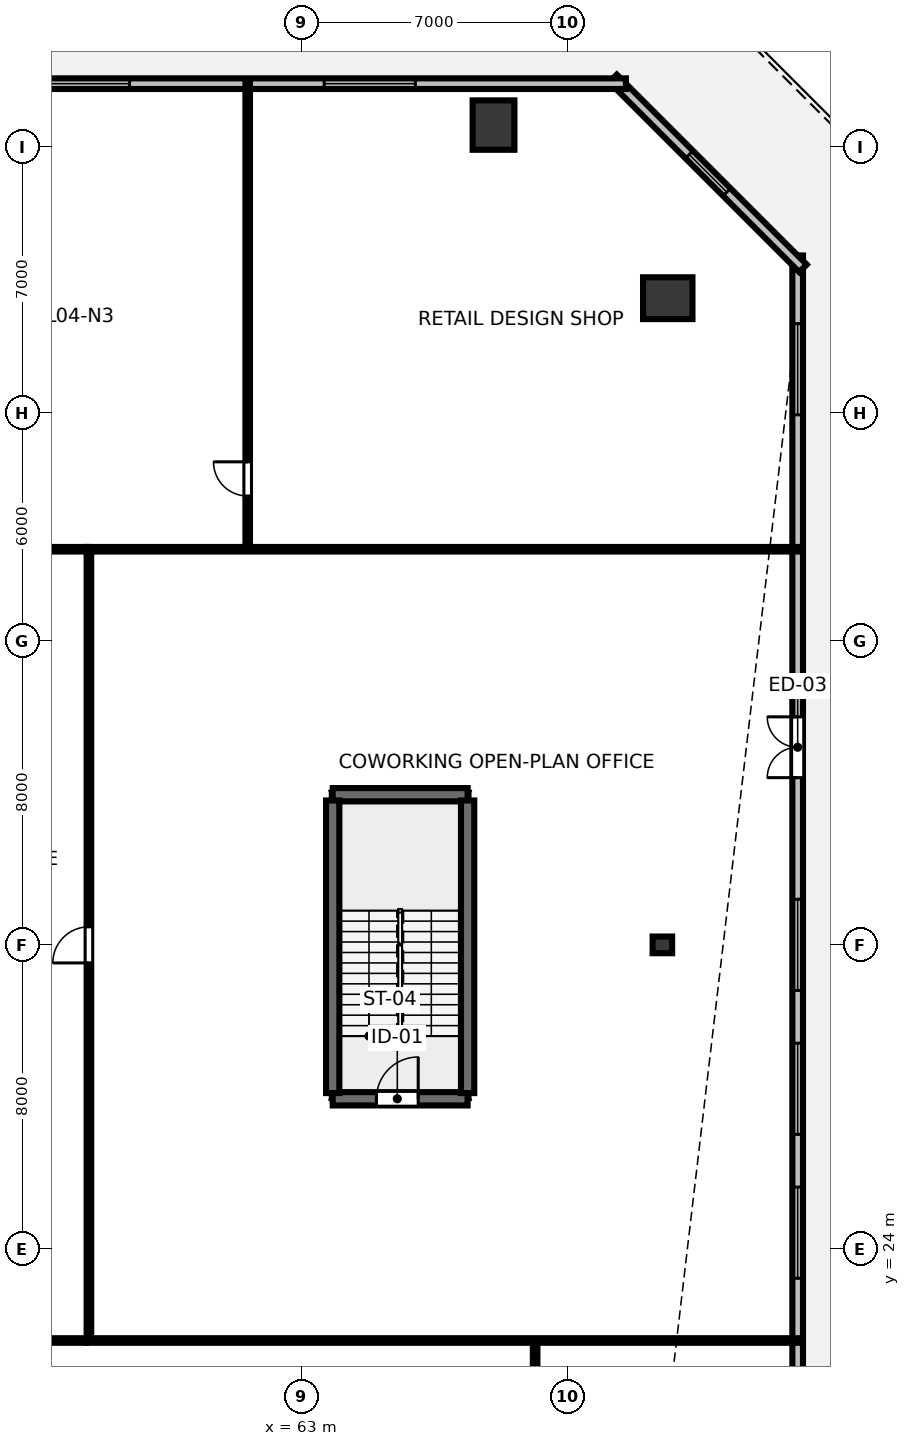
"""IFC4 building model, lengths in metres.
Left out: names, types, materials, properties, quantities, classifications, styles, units other than length and angle.
Written with IfcOpenShell. Run it as: python <this file> out.ifc"""

import sys

from ifc_helpers import new_model, si_unit, direction, frame, frame_2d, origin, origin_2d, place, context, subcontext, project, spatial, rectangle, hollow_rectangle, i_section, extrude, element, fill, save


model = new_model("IFC4")
c1 = context("Model", 3, precision=1e-05, world=origin(), true_north=direction((0.0, 1.0)))
c2 = subcontext(c1, "Body", "Model", "MODEL_VIEW")
j1 = project(units=[si_unit("LENGTHUNIT", "METRE"), si_unit("PLANEANGLEUNIT", "RADIAN")], contexts=[c1])
p1 = place(None, origin())
s1 = spatial("IfcSite", under=j1, at=p1, CompositionType="ELEMENT")
p2 = place(p1, origin())
s2 = spatial("IfcBuilding", under=s1, at=p2, CompositionType="ELEMENT")
p3 = place(p2, frame((0.0, 0.0, 18.5)))
s3 = spatial("IfcBuildingStorey", under=s2, at=p3, CompositionType="ELEMENT", Elevation=18.5)
p4 = place(p3, frame((72.5, 32.0, 0.0), z_axis=(0.0, 0.0, 1.0), x_axis=(0.0, 1.0, 0.0)))
e1 = element("IfcColumn", 1, at=p4, inside=s3, PredefinedType="COLUMN", context=c2, shape_type="SweptSolid", body=[
    extrude(i_section(OverallWidth=0.439, OverallDepth=0.514, WebThickness=0.06, FlangeThickness=0.097, FilletRadius=0.025, at=origin_2d()), origin(), (0.0, 0.0, 1.0), 4.048),
])
for number, where, z_axis, x_axis in (
    (2, (72.642, 49.016, 0.0), (0.0, 0.0, 1.0), (0.0, 1.0, 0.0)),
    (3, (68.057, 53.571, 0.0), (0.0, 0.0, 1.0), (1.0, 0.0, 0.0)),
):
    element("IfcColumn", number, at=place(p3, frame(where, z_axis=z_axis, x_axis=x_axis)), inside=s3, PredefinedType="COLUMN", context=c2, shape_type="SweptSolid", body=[
        extrude(hollow_rectangle(XDim=1.1, YDim=1.3, WallThickness=0.07, at=origin_2d()), origin(), (0.0, 0.0, 1.0), 4.048),
    ])
p5 = place(p3, frame((76.06, 13.86, 0.0), z_axis=(0.0, 0.0, 1.0), x_axis=(0.0, 1.0, 0.0)))
e4 = element("IfcWall", 4, at=p5, inside=s3, PredefinedType="STANDARD", context=c2, shape_type="SweptSolid", body=[
    extrude(rectangle(XDim=36.28, YDim=0.28, at=frame_2d((18.14, 0.0))), origin(), (0.0, 0.0, 1.0), 4.05),
])
p6 = place(p5, frame((22.54, 0.0, 0.0)))
e5 = element("IfcOpeningElement", 5, at=p6, cuts=e4, PredefinedType="OPENING", context=c2, shape_type="SweptSolid", body=[
    extrude(rectangle(XDim=1.6, YDim=2.15, at=frame_2d((0.8, 1.075))), frame((0.0, 0.15, 0.0), z_axis=(0.0, -1.0, 0.0), x_axis=(1.0, 0.0, 0.0)), (0.0, 0.0, 1.0), 0.3),
])
p7 = place(p5, frame((1.793, 0.0, 0.85)))
e6 = element("IfcOpeningElement", 6, at=p7, cuts=e4, PredefinedType="OPENING", context=c2, shape_type="SweptSolid", body=[
    extrude(rectangle(XDim=2.4, YDim=2.4, at=frame_2d((1.2, 1.2))), frame((0.0, 0.15, 0.0), z_axis=(0.0, -1.0, 0.0), x_axis=(1.0, 0.0, 0.0)), (0.0, 0.0, 1.0), 0.3),
])
p8 = place(p5, frame((9.367, 0.0, 0.85)))
e7 = element("IfcOpeningElement", 7, at=p8, cuts=e4, PredefinedType="OPENING", context=c2, shape_type="SweptSolid", body=[
    extrude(rectangle(XDim=2.4, YDim=2.4, at=frame_2d((1.2, 1.2))), frame((0.0, 0.15, 0.0), z_axis=(0.0, -1.0, 0.0), x_axis=(1.0, 0.0, 0.0)), (0.0, 0.0, 1.0), 0.3),
])
p9 = place(p5, frame((13.153, 0.0, 0.85)))
e8 = element("IfcOpeningElement", 8, at=p9, cuts=e4, PredefinedType="OPENING", context=c2, shape_type="SweptSolid", body=[
    extrude(rectangle(XDim=2.4, YDim=2.4, at=frame_2d((1.2, 1.2))), frame((0.0, 0.15, 0.0), z_axis=(0.0, -1.0, 0.0), x_axis=(1.0, 0.0, 0.0)), (0.0, 0.0, 1.0), 0.3),
])
p10 = place(p5, frame((16.94, 0.0, 0.85)))
e9 = element("IfcOpeningElement", 9, at=p10, cuts=e4, PredefinedType="OPENING", context=c2, shape_type="SweptSolid", body=[
    extrude(rectangle(XDim=2.4, YDim=2.4, at=frame_2d((1.2, 1.2))), frame((0.0, 0.15, 0.0), z_axis=(0.0, -1.0, 0.0), x_axis=(1.0, 0.0, 0.0)), (0.0, 0.0, 1.0), 0.3),
])
p11 = place(p5, frame((32.087, 0.0, 0.85)))
e10 = element("IfcOpeningElement", 10, at=p11, cuts=e4, PredefinedType="OPENING", context=c2, shape_type="SweptSolid", body=[
    extrude(rectangle(XDim=2.4, YDim=2.4, at=frame_2d((1.2, 1.2))), frame((0.0, 0.15, 0.0), z_axis=(0.0, -1.0, 0.0), x_axis=(1.0, 0.0, 0.0)), (0.0, 0.0, 1.0), 0.3),
])
p12 = place(p3, frame((76.2, 49.802, 0.0), z_axis=(0.0, 0.0, 1.0), x_axis=(-0.707106781187, 0.707106781187, 0.0)))
e11 = element("IfcWall", 11, at=p12, inside=s3, PredefinedType="STANDARD", context=c2, shape_type="SweptSolid", body=[
    extrude(rectangle(XDim=7.068, YDim=0.28, at=frame_2d((3.534, 0.0))), origin(), (0.0, 0.0, 1.0), 4.05),
])
p13 = place(p12, frame((2.834, 0.0, 1.5)))
e12 = element("IfcOpeningElement", 12, at=p13, cuts=e11, PredefinedType="OPENING", context=c2, shape_type="SweptSolid", body=[
    extrude(rectangle(XDim=1.4, YDim=1.2, at=frame_2d((0.7, 0.6))), frame((0.0, 0.15, 0.0), z_axis=(0.0, -1.0, 0.0), x_axis=(1.0, 0.0, 0.0)), (0.0, 0.0, 1.0), 0.3),
])
p14 = place(p3, frame((71.54, 54.66, 0.0), z_axis=(0.0, 0.0, 1.0), x_axis=(-1.0, 0.0, 0.0)))
e13 = element("IfcWall", 13, at=p14, inside=s3, PredefinedType="STANDARD", context=c2, shape_type="SweptSolid", body=[
    extrude(rectangle(XDim=51.08, YDim=0.28, at=frame_2d((25.54, 0.0))), origin(), (0.0, 0.0, 1.0), 4.05),
])
p15 = place(p14, frame((5.54, 0.0, 0.85)))
e14 = element("IfcOpeningElement", 14, at=p15, cuts=e13, PredefinedType="OPENING", context=c2, shape_type="SweptSolid", body=[
    extrude(rectangle(XDim=2.4, YDim=2.4, at=frame_2d((1.2, 1.2))), frame((0.0, 0.15, 0.0), z_axis=(0.0, -1.0, 0.0), x_axis=(1.0, 0.0, 0.0)), (0.0, 0.0, 1.0), 0.3),
])
p16 = place(p14, frame((13.06, 0.0, 0.85)))
e15 = element("IfcOpeningElement", 15, at=p16, cuts=e13, PredefinedType="OPENING", context=c2, shape_type="SweptSolid", body=[
    extrude(rectangle(XDim=2.4, YDim=2.4, at=frame_2d((1.2, 1.2))), frame((0.0, 0.15, 0.0), z_axis=(0.0, -1.0, 0.0), x_axis=(1.0, 0.0, 0.0)), (0.0, 0.0, 1.0), 0.3),
])
p17 = place(p14, frame((16.82, 0.0, 0.85)))
e16 = element("IfcOpeningElement", 16, at=p17, cuts=e13, PredefinedType="OPENING", context=c2, shape_type="SweptSolid", body=[
    extrude(rectangle(XDim=2.4, YDim=2.4, at=frame_2d((1.2, 1.2))), frame((0.0, 0.15, 0.0), z_axis=(0.0, -1.0, 0.0), x_axis=(1.0, 0.0, 0.0)), (0.0, 0.0, 1.0), 0.3),
])
p18 = place(p14, frame((20.58, 0.0, 0.85)))
e17 = element("IfcOpeningElement", 17, at=p18, cuts=e13, PredefinedType="OPENING", context=c2, shape_type="SweptSolid", body=[
    extrude(rectangle(XDim=2.4, YDim=2.4, at=frame_2d((1.2, 1.2))), frame((0.0, 0.15, 0.0), z_axis=(0.0, -1.0, 0.0), x_axis=(1.0, 0.0, 0.0)), (0.0, 0.0, 1.0), 0.3),
])
p19 = place(p14, frame((28.1, 0.0, 0.85)))
e18 = element("IfcOpeningElement", 18, at=p19, cuts=e13, PredefinedType="OPENING", context=c2, shape_type="SweptSolid", body=[
    extrude(rectangle(XDim=2.4, YDim=2.4, at=frame_2d((1.2, 1.2))), frame((0.0, 0.15, 0.0), z_axis=(0.0, -1.0, 0.0), x_axis=(1.0, 0.0, 0.0)), (0.0, 0.0, 1.0), 0.3),
])
p20 = place(p14, frame((31.86, 0.0, 0.85)))
e19 = element("IfcOpeningElement", 19, at=p20, cuts=e13, PredefinedType="OPENING", context=c2, shape_type="SweptSolid", body=[
    extrude(rectangle(XDim=2.4, YDim=2.4, at=frame_2d((1.2, 1.2))), frame((0.0, 0.15, 0.0), z_axis=(0.0, -1.0, 0.0), x_axis=(1.0, 0.0, 0.0)), (0.0, 0.0, 1.0), 0.3),
])
p21 = place(p14, frame((35.62, 0.0, 0.85)))
e20 = element("IfcOpeningElement", 20, at=p21, cuts=e13, PredefinedType="OPENING", context=c2, shape_type="SweptSolid", body=[
    extrude(rectangle(XDim=2.4, YDim=2.4, at=frame_2d((1.2, 1.2))), frame((0.0, 0.15, 0.0), z_axis=(0.0, -1.0, 0.0), x_axis=(1.0, 0.0, 0.0)), (0.0, 0.0, 1.0), 0.3),
])
p22 = place(p14, frame((43.14, 0.0, 0.85)))
e21 = element("IfcOpeningElement", 21, at=p22, cuts=e13, PredefinedType="OPENING", context=c2, shape_type="SweptSolid", body=[
    extrude(rectangle(XDim=2.4, YDim=2.4, at=frame_2d((1.2, 1.2))), frame((0.0, 0.15, 0.0), z_axis=(0.0, -1.0, 0.0), x_axis=(1.0, 0.0, 0.0)), (0.0, 0.0, 1.0), 0.3),
])
p23 = place(p3, frame((69.151, 21.59, 0.0), z_axis=(0.0, 0.0, 1.0), x_axis=(0.0, -1.0, 0.0)))
e22 = element("IfcWall", 22, at=p23, inside=s3, PredefinedType="PARTITIONING", context=c2, shape_type="SweptSolid", body=[
    extrude(rectangle(XDim=12.25, YDim=0.12, at=frame_2d((6.125, 0.0))), origin(), (0.0, 0.0, 1.0), 2.89),
])
p24 = place(p23, frame((1.4, 0.0, 0.0)))
e23 = element("IfcOpeningElement", 23, at=p24, cuts=e22, PredefinedType="OPENING", context=c2, shape_type="SweptSolid", body=[
    extrude(rectangle(XDim=0.9, YDim=2.15, at=frame_2d((0.45, 1.075))), frame((0.0, 0.07, 0.0), z_axis=(0.0, -1.0, 0.0), x_axis=(1.0, 0.0, 0.0)), (0.0, 0.0, 1.0), 0.14),
])
p25 = place(p3, frame((34.65, 21.59, 0.0), z_axis=(0.0, 0.0, 1.0), x_axis=(1.0, 0.0, 0.0)))
e24 = element("IfcWall", 24, at=p25, inside=s3, PredefinedType="PARTITIONING", context=c2, shape_type="SweptSolid", body=[
    extrude(rectangle(XDim=22.7, YDim=0.12, at=frame_2d((11.35, 0.0))), origin(), (0.0, 0.0, 1.0), 2.89),
])
p26 = place(p25, frame((8.028, 0.0, 0.0)))
e25 = element("IfcOpeningElement", 25, at=p26, cuts=e24, PredefinedType="OPENING", context=c2, shape_type="SweptSolid", body=[
    extrude(rectangle(XDim=0.95, YDim=2.15, at=frame_2d((0.475, 1.075))), frame((0.0, 0.07, 0.0), z_axis=(0.0, -1.0, 0.0), x_axis=(1.0, 0.0, 0.0)), (0.0, 0.0, 1.0), 0.14),
])
p27 = place(p25, frame((19.238, 0.0, 0.0)))
e26 = element("IfcOpeningElement", 26, at=p27, cuts=e24, PredefinedType="OPENING", context=c2, shape_type="SweptSolid", body=[
    extrude(rectangle(XDim=0.95, YDim=2.15, at=frame_2d((0.475, 1.075))), frame((0.0, 0.07, 0.0), z_axis=(0.0, -1.0, 0.0), x_axis=(1.0, 0.0, 0.0)), (0.0, 0.0, 1.0), 0.14),
])
p28 = place(p3, frame((61.588, 42.41, 0.0), z_axis=(0.0, 0.0, 1.0), x_axis=(0.0, 1.0, 0.0)))
e27 = element("IfcWall", 27, at=p28, inside=s3, PredefinedType="PARTITIONING", context=c2, shape_type="SweptSolid", body=[
    extrude(rectangle(XDim=12.25, YDim=0.12, at=frame_2d((6.125, 0.0))), origin(), (0.0, 0.0, 1.0), 2.89),
])
p29 = place(p28, frame((1.4, 0.0, 0.0)))
e28 = element("IfcOpeningElement", 28, at=p29, cuts=e27, PredefinedType="OPENING", context=c2, shape_type="SweptSolid", body=[
    extrude(rectangle(XDim=0.9, YDim=2.15, at=frame_2d((0.45, 1.075))), frame((0.0, 0.07, 0.0), z_axis=(0.0, -1.0, 0.0), x_axis=(1.0, 0.0, 0.0)), (0.0, 0.0, 1.0), 0.14),
])
p30 = place(p3, frame((34.65, 42.41, 0.0), z_axis=(0.0, 0.0, 1.0), x_axis=(1.0, 0.0, 0.0)))
e29 = element("IfcWall", 29, at=p30, inside=s3, PredefinedType="PARTITIONING", context=c2, shape_type="SweptSolid", body=[
    extrude(rectangle(XDim=22.7, YDim=0.12, at=frame_2d((11.35, 0.0))), origin(), (0.0, 0.0, 1.0), 2.89),
])
p31 = place(p30, frame((4.792, 0.0, 0.0)))
e30 = element("IfcOpeningElement", 30, at=p31, cuts=e29, PredefinedType="OPENING", context=c2, shape_type="SweptSolid", body=[
    extrude(rectangle(XDim=0.95, YDim=2.15, at=frame_2d((0.475, 1.075))), frame((0.0, 0.07, 0.0), z_axis=(0.0, -1.0, 0.0), x_axis=(1.0, 0.0, 0.0)), (0.0, 0.0, 1.0), 0.14),
])
p32 = place(p30, frame((16.002, 0.0, 0.0)))
e31 = element("IfcOpeningElement", 31, at=p32, cuts=e29, PredefinedType="OPENING", context=c2, shape_type="SweptSolid", body=[
    extrude(rectangle(XDim=0.95, YDim=2.15, at=frame_2d((0.475, 1.075))), frame((0.0, 0.07, 0.0), z_axis=(0.0, -1.0, 0.0), x_axis=(1.0, 0.0, 0.0)), (0.0, 0.0, 1.0), 0.14),
])
p33 = place(p3, frame((57.41, 21.65, 0.0), z_axis=(0.0, 0.0, 1.0), x_axis=(0.0, 1.0, 0.0)))
e32 = element("IfcWall", 32, at=p33, inside=s3, PredefinedType="PARTITIONING", context=c2, shape_type="SweptSolid", body=[
    extrude(rectangle(XDim=20.7, YDim=0.12, at=frame_2d((10.35, 0.0))), origin(), (0.0, 0.0, 1.0), 2.89),
])
p34 = place(p33, frame((9.875, 0.0, 0.0)))
e33 = element("IfcOpeningElement", 33, at=p34, cuts=e32, PredefinedType="OPENING", context=c2, shape_type="SweptSolid", body=[
    extrude(rectangle(XDim=0.95, YDim=2.15, at=frame_2d((0.475, 1.075))), frame((0.0, 0.07, 0.0), z_axis=(0.0, -1.0, 0.0), x_axis=(1.0, 0.0, 0.0)), (0.0, 0.0, 1.0), 0.14),
])
for number, where, z_axis, x_axis in (
    (34, (57.35, 21.59, 0.0), (0.0, 0.0, 1.0), (1.0, 0.0, 0.0)),
    (35, (57.35, 42.41, 0.0), (0.0, 0.0, 1.0), (1.0, 0.0, 0.0)),
):
    element("IfcWall", number, at=place(p3, frame(where, z_axis=z_axis, x_axis=x_axis)), inside=s3, PredefinedType="PARTITIONING", context=c2, shape_type="SweptSolid", body=[
        extrude(rectangle(XDim=18.71, YDim=0.12, at=frame_2d((9.355, 0.0))), origin(), (0.0, 0.0, 1.0), 2.89),
    ])
p35 = place(p3, frame((63.825, 27.95, 0.0), z_axis=(0.0, 0.0, 1.0), x_axis=(1.0, 0.0, 0.0)))
e36 = element("IfcWall", 36, at=p35, inside=s3, PredefinedType="SHEAR", context=c2, shape_type="SweptSolid", body=[
    extrude(rectangle(XDim=3.55, YDim=0.35, at=frame_2d((1.775, 0.0))), origin(), (0.0, 0.0, 1.0), 4.5),
])
p36 = place(p35, frame((1.15, 0.0, 0.0)))
e37 = element("IfcOpeningElement", 37, at=p36, cuts=e36, PredefinedType="OPENING", context=c2, shape_type="SweptSolid", body=[
    extrude(rectangle(XDim=1.1, YDim=2.15, at=frame_2d((0.55, 1.075))), frame((0.0, 0.185, 0.0), z_axis=(0.0, -1.0, 0.0), x_axis=(1.0, 0.0, 0.0)), (0.0, 0.0, 1.0), 0.37),
])
p37 = place(p3, frame((63.825, 35.95, 0.0), z_axis=(0.0, 0.0, 1.0), x_axis=(1.0, 0.0, 0.0)))
e38 = element("IfcWall", 38, at=p37, inside=s3, PredefinedType="SHEAR", context=c2, shape_type="SweptSolid", body=[
    extrude(rectangle(XDim=3.55, YDim=0.35, at=frame_2d((1.775, 0.0))), origin(), (0.0, 0.0, 1.0), 4.5),
])
for number, where, z_axis, x_axis in (
    (39, (63.825, 28.1, 0.0), (0.0, 0.0, 1.0), (0.0, 1.0, 0.0)),
    (40, (67.375, 28.1, 0.0), (0.0, 0.0, 1.0), (0.0, 1.0, 0.0)),
):
    element("IfcWall", number, at=place(p3, frame(where, z_axis=z_axis, x_axis=x_axis)), inside=s3, PredefinedType="SHEAR", context=c2, shape_type="SweptSolid", body=[
        extrude(rectangle(XDim=7.7, YDim=0.35, at=frame_2d((3.85, 0.0))), origin(), (0.0, 0.0, 1.0), 4.5),
    ])
p38 = place(p6, origin())
e41 = element("IfcDoor", 41, at=p38, inside=s3, OperationType="DOUBLE_DOOR_SINGLE_SWING", PredefinedType="DOOR", context=c2, shape_type="SweptSolid", body=[
    extrude(rectangle(XDim=1.6, YDim=2.15, at=frame_2d((0.8, 1.075))), frame((0.0, 0.025, 0.0), z_axis=(0.0, -1.0, 0.0), x_axis=(1.0, 0.0, 0.0)), (0.0, 0.0, 1.0), 0.05),
])
fill(e5, e41)
p39 = place(p8, origin())
e42 = element("IfcWindow", 42, at=p39, inside=s3, PartitioningType="SINGLE_PANEL", PredefinedType="WINDOW", context=c2, shape_type="SweptSolid", body=[
    extrude(rectangle(XDim=2.4, YDim=2.4, at=frame_2d((1.2, 1.2))), frame((0.0, 0.03, 0.0), z_axis=(0.0, -1.0, 0.0), x_axis=(1.0, 0.0, 0.0)), (0.0, 0.0, 1.0), 0.06),
])
fill(e7, e42)
p40 = place(p9, origin())
e43 = element("IfcWindow", 43, at=p40, inside=s3, PartitioningType="SINGLE_PANEL", PredefinedType="WINDOW", context=c2, shape_type="SweptSolid", body=[
    extrude(rectangle(XDim=2.4, YDim=2.4, at=frame_2d((1.2, 1.2))), frame((0.0, 0.03, 0.0), z_axis=(0.0, -1.0, 0.0), x_axis=(1.0, 0.0, 0.0)), (0.0, 0.0, 1.0), 0.06),
])
fill(e8, e43)
p41 = place(p10, origin())
e44 = element("IfcWindow", 44, at=p41, inside=s3, PartitioningType="SINGLE_PANEL", PredefinedType="WINDOW", context=c2, shape_type="SweptSolid", body=[
    extrude(rectangle(XDim=2.4, YDim=2.4, at=frame_2d((1.2, 1.2))), frame((0.0, 0.03, 0.0), z_axis=(0.0, -1.0, 0.0), x_axis=(1.0, 0.0, 0.0)), (0.0, 0.0, 1.0), 0.06),
])
fill(e9, e44)
p42 = place(p11, origin())
e45 = element("IfcWindow", 45, at=p42, inside=s3, PartitioningType="SINGLE_PANEL", PredefinedType="WINDOW", context=c2, shape_type="SweptSolid", body=[
    extrude(rectangle(XDim=2.4, YDim=2.4, at=frame_2d((1.2, 1.2))), frame((0.0, 0.03, 0.0), z_axis=(0.0, -1.0, 0.0), x_axis=(1.0, 0.0, 0.0)), (0.0, 0.0, 1.0), 0.06),
])
fill(e10, e45)
p43 = place(p13, origin())
e46 = element("IfcWindow", 46, at=p43, inside=s3, PartitioningType="SINGLE_PANEL", PredefinedType="WINDOW", context=c2, shape_type="SweptSolid", body=[
    extrude(rectangle(XDim=1.4, YDim=1.2, at=frame_2d((0.7, 0.6))), frame((0.0, 0.03, 0.0), z_axis=(0.0, -1.0, 0.0), x_axis=(1.0, 0.0, 0.0)), (0.0, 0.0, 1.0), 0.06),
])
fill(e12, e46)
p44 = place(p15, origin())
e47 = element("IfcWindow", 47, at=p44, inside=s3, PartitioningType="SINGLE_PANEL", PredefinedType="WINDOW", context=c2, shape_type="SweptSolid", body=[
    extrude(rectangle(XDim=2.4, YDim=2.4, at=frame_2d((1.2, 1.2))), frame((0.0, 0.03, 0.0), z_axis=(0.0, -1.0, 0.0), x_axis=(1.0, 0.0, 0.0)), (0.0, 0.0, 1.0), 0.06),
])
fill(e14, e47)
p45 = place(p16, origin())
e48 = element("IfcWindow", 48, at=p45, inside=s3, PartitioningType="SINGLE_PANEL", PredefinedType="WINDOW", context=c2, shape_type="SweptSolid", body=[
    extrude(rectangle(XDim=2.4, YDim=2.4, at=frame_2d((1.2, 1.2))), frame((0.0, 0.03, 0.0), z_axis=(0.0, -1.0, 0.0), x_axis=(1.0, 0.0, 0.0)), (0.0, 0.0, 1.0), 0.06),
])
fill(e15, e48)
p46 = place(p29, origin())
e49 = element("IfcDoor", 49, at=p46, inside=s3, OperationType="SINGLE_SWING_RIGHT", PredefinedType="DOOR", context=c2, shape_type="SweptSolid", body=[
    extrude(rectangle(XDim=0.9, YDim=2.15, at=frame_2d((0.45, 1.075))), frame((0.0, 0.025, 0.0), z_axis=(0.0, -1.0, 0.0), x_axis=(1.0, 0.0, 0.0)), (0.0, 0.0, 1.0), 0.05),
])
fill(e28, e49)
p47 = place(p34, origin())
e50 = element("IfcDoor", 50, at=p47, inside=s3, OperationType="SINGLE_SWING_LEFT", PredefinedType="DOOR", context=c2, shape_type="SweptSolid", body=[
    extrude(rectangle(XDim=0.95, YDim=2.15, at=frame_2d((0.475, 1.075))), frame((0.0, 0.025, 0.0), z_axis=(0.0, -1.0, 0.0), x_axis=(1.0, 0.0, 0.0)), (0.0, 0.0, 1.0), 0.05),
])
fill(e33, e50)
p48 = place(p36, origin())
e51 = element("IfcDoor", 51, at=p48, inside=s3, OperationType="SINGLE_SWING_RIGHT", PredefinedType="DOOR", context=c2, shape_type="SweptSolid", body=[
    extrude(rectangle(XDim=1.1, YDim=2.15, at=frame_2d((0.55, 1.075))), frame((0.0, 0.025, 0.0), z_axis=(0.0, -1.0, 0.0), x_axis=(1.0, 0.0, 0.0)), (0.0, 0.0, 1.0), 0.05),
])
fill(e37, e51)
save(model, sys.argv[1])
